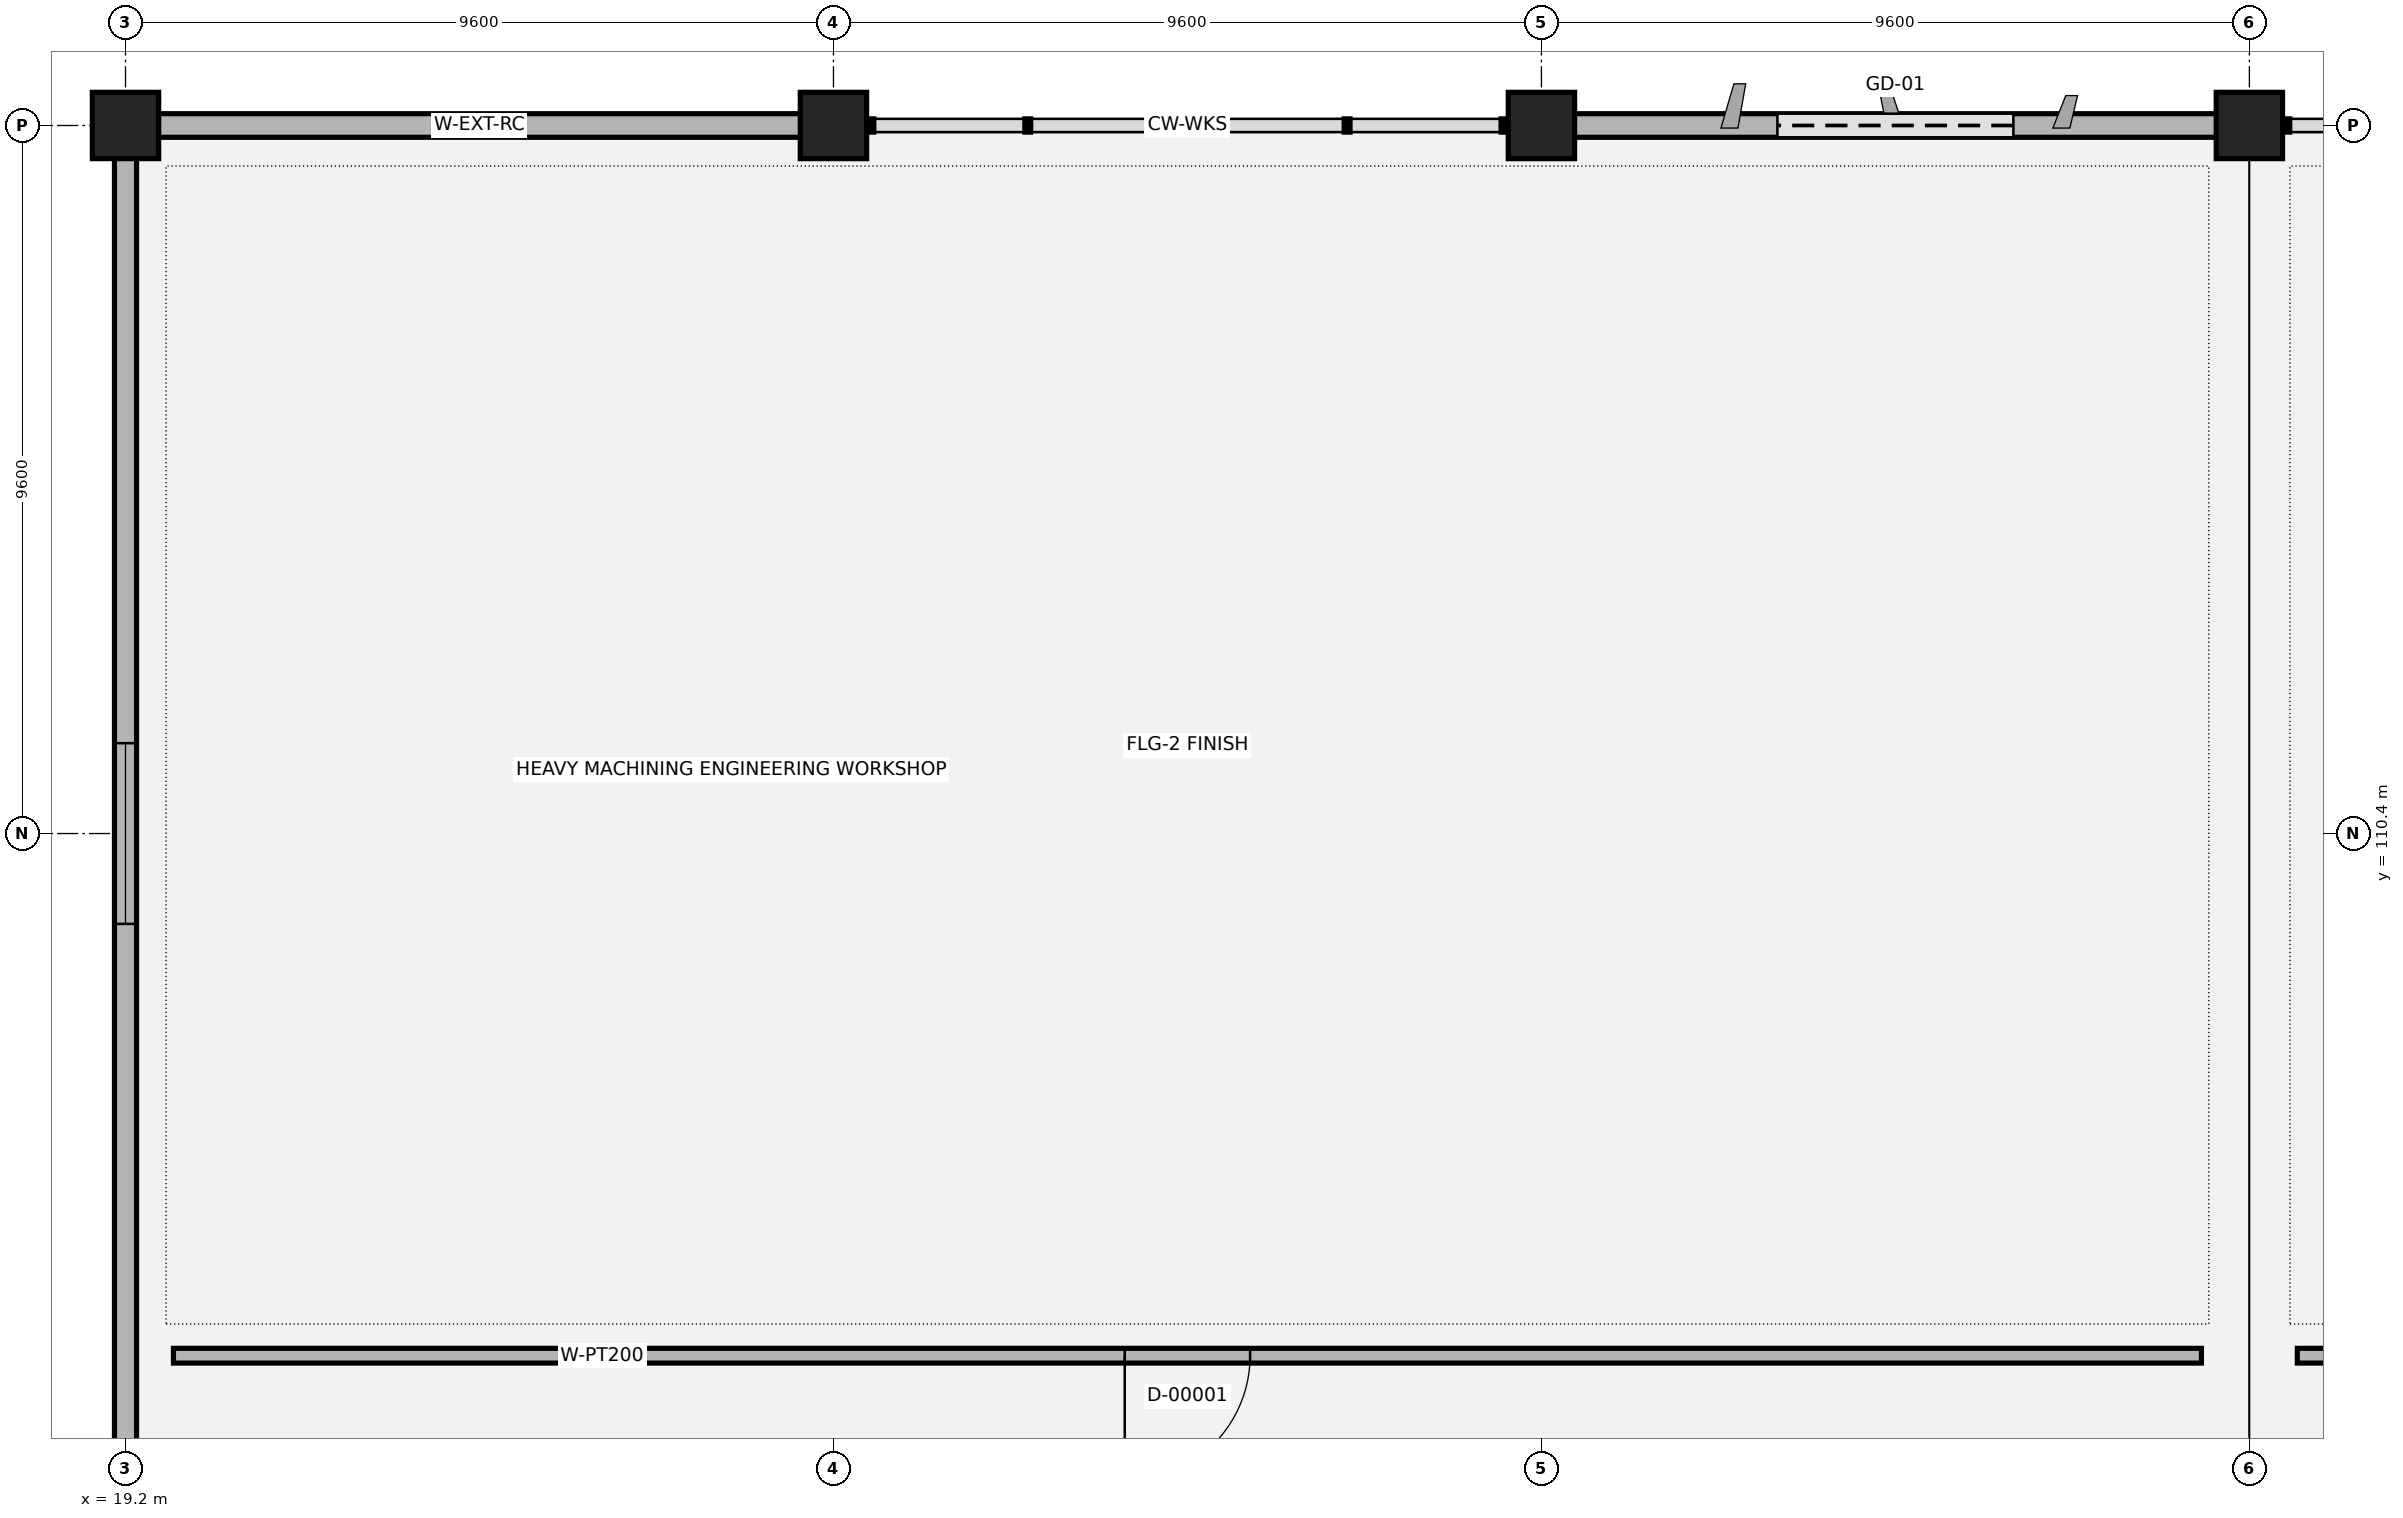
"""IFC4 building model, lengths in metres.
Left out: names, types, materials, properties, quantities, classifications, styles, units other than length and angle.
Written with IfcOpenShell. Run it as: python <this file> out.ifc"""

import sys

from ifc_helpers import new_model, si_unit, direction, frame, frame_2d, origin, origin_2d, place, context, subcontext, project, spatial, rectangle, extrude, element, fill, save


model = new_model("IFC4")
c1 = context("Model", 3, precision=1e-05, world=origin(), true_north=direction((0.0, 1.0)))
c2 = subcontext(c1, "Body", "Model", "MODEL_VIEW")
j1 = project(units=[si_unit("LENGTHUNIT", "METRE"), si_unit("PLANEANGLEUNIT", "RADIAN")], contexts=[c1])
p1 = place(None, origin())
s1 = spatial("IfcSite", under=j1, at=p1, CompositionType="ELEMENT")
p2 = place(p1, origin())
s2 = spatial("IfcBuilding", under=s1, at=p2, CompositionType="ELEMENT")
p3 = place(p2, origin())
s3 = spatial("IfcBuildingStorey", under=s2, at=p3, CompositionType="ELEMENT", Elevation=0.0)
for number, where, z_axis, x_axis in (
    (1, (19.2, 120.0, 0.0), (0.0, 0.0, 1.0), (1.0, 0.0, 0.0)),
    (2, (28.8, 120.0, 0.0), (0.0, 0.0, 1.0), (1.0, 0.0, 0.0)),
    (3, (38.4, 120.0, 0.0), (0.0, 0.0, 1.0), (1.0, 0.0, 0.0)),
    (4, (48.0, 120.0, 0.0), (0.0, 0.0, 1.0), (1.0, 0.0, 0.0)),
):
    element("IfcColumn", number, at=place(p3, frame(where, z_axis=z_axis, x_axis=x_axis)), inside=s3, PredefinedType="COLUMN", context=c2, shape_type="SweptSolid", body=[
        extrude(rectangle(XDim=0.9, YDim=0.9, at=origin_2d()), origin(), (0.0, 0.0, 1.0), 5.4),
    ])
p4 = place(p3, frame((28.42, 120.0, 0.0), z_axis=(0.0, 0.0, 1.0), x_axis=(-1.0, 0.0, 0.0)))
e5 = element("IfcWall", 5, at=p4, inside=s3, PredefinedType="SOLIDWALL", context=c2, shape_type="SweptSolid", body=[
    extrude(rectangle(XDim=8.84, YDim=0.32, at=frame_2d((4.42, 0.0))), origin(), (0.0, 0.0, 1.0), 4.04),
])
p5 = place(p3, frame((47.62, 120.0, 0.0), z_axis=(0.0, 0.0, 1.0), x_axis=(-1.0, 0.0, 0.0)))
e6 = element("IfcWall", 6, at=p5, inside=s3, PredefinedType="SOLIDWALL", context=c2, shape_type="SweptSolid", body=[
    extrude(rectangle(XDim=8.84, YDim=0.32, at=frame_2d((4.42, 0.0))), origin(), (0.0, 0.0, 1.0), 4.04),
])
p6 = place(p5, frame((2.82, 0.0, 0.0)))
e7 = element("IfcOpeningElement", 7, at=p6, cuts=e6, PredefinedType="OPENING", context=c2, shape_type="SweptSolid", body=[
    extrude(rectangle(XDim=3.2, YDim=3.0, at=frame_2d((1.6, 1.5))), frame((0.0, 0.17, 0.0), z_axis=(0.0, -1.0, 0.0), x_axis=(1.0, 0.0, 0.0)), (0.0, 0.0, 1.0), 0.34),
])
p7 = place(p3, frame((19.2, 119.62, 0.0), z_axis=(0.0, 0.0, 1.0), x_axis=(0.0, -1.0, 0.0)))
e8 = element("IfcWall", 8, at=p7, inside=s3, PredefinedType="SOLIDWALL", context=c2, shape_type="SweptSolid", body=[
    extrude(rectangle(XDim=18.44, YDim=0.3, at=frame_2d((9.22, 0.0))), origin(), (0.0, 0.0, 1.0), 4.14),
])
p8 = place(p7, frame((7.995, 0.0, 0.9)))
e9 = element("IfcOpeningElement", 9, at=p8, cuts=e8, PredefinedType="OPENING", context=c2, shape_type="SweptSolid", body=[
    extrude(rectangle(XDim=2.45, YDim=1.7, at=frame_2d((1.225, 0.85))), frame((0.0, 0.16, 0.0), z_axis=(0.0, -1.0, 0.0), x_axis=(1.0, 0.0, 0.0)), (0.0, 0.0, 1.0), 0.32),
])
p9 = place(p3, frame((19.85, 103.32, 0.0), z_axis=(0.0, 0.0, 1.0), x_axis=(1.0, 0.0, 0.0)))
e10 = element("IfcWall", 10, at=p9, inside=s3, PredefinedType="PARTITIONING", context=c2, shape_type="SweptSolid", body=[
    extrude(rectangle(XDim=27.5, YDim=0.2, at=frame_2d((13.75, 0.0))), origin(), (0.0, 0.0, 1.0), 4.04),
])
p10 = place(p9, frame((12.9, 0.0, 0.0)))
e11 = element("IfcOpeningElement", 11, at=p10, cuts=e10, PredefinedType="OPENING", context=c2, shape_type="SweptSolid", body=[
    extrude(rectangle(XDim=1.7, YDim=2.2, at=frame_2d((0.85, 1.1))), frame((0.0, 0.11, 0.0), z_axis=(0.0, -1.0, 0.0), x_axis=(1.0, 0.0, 0.0)), (0.0, 0.0, 1.0), 0.22),
])
p11 = place(p3, frame((48.65, 103.32, 0.0), z_axis=(0.0, 0.0, 1.0), x_axis=(1.0, 0.0, 0.0)))
e12 = element("IfcWall", 12, at=p11, inside=s3, PredefinedType="PARTITIONING", context=c2, shape_type="SweptSolid", body=[
    extrude(rectangle(XDim=27.5, YDim=0.2, at=frame_2d((13.75, 0.0))), origin(), (0.0, 0.0, 1.0), 4.04),
])
p12 = place(p11, frame((4.135, 0.0, 0.0)))
e13 = element("IfcOpeningElement", 13, at=p12, cuts=e12, PredefinedType="OPENING", context=c2, shape_type="SweptSolid", body=[
    extrude(rectangle(XDim=1.8, YDim=2.2, at=frame_2d((0.9, 1.1))), frame((0.0, 0.11, 0.0), z_axis=(0.0, -1.0, 0.0), x_axis=(1.0, 0.0, 0.0)), (0.0, 0.0, 1.0), 0.22),
])
p13 = place(p6, origin())
e14 = element("IfcDoor", 14, at=p13, inside=s3, OperationType="ROLLINGUP", PredefinedType="GATE", context=c2, shape_type="SweptSolid", body=[
    extrude(rectangle(XDim=3.2, YDim=3.0, at=frame_2d((1.6, 1.5))), frame((0.0, 0.025, 0.0), z_axis=(0.0, -1.0, 0.0), x_axis=(1.0, 0.0, 0.0)), (0.0, 0.0, 1.0), 0.05),
])
fill(e7, e14)
p14 = place(p8, origin())
e15 = element("IfcWindow", 15, at=p14, inside=s3, PartitioningType="SINGLE_PANEL", PredefinedType="WINDOW", context=c2, shape_type="SweptSolid", body=[
    extrude(rectangle(XDim=2.45, YDim=1.7, at=frame_2d((1.225, 0.85))), frame((0.0, 0.03, 0.0), z_axis=(0.0, -1.0, 0.0), x_axis=(1.0, 0.0, 0.0)), (0.0, 0.0, 1.0), 0.06),
])
fill(e9, e15)
p15 = place(p10, origin())
e16 = element("IfcDoor", 16, at=p15, inside=s3, OperationType="SINGLE_SWING_RIGHT", PredefinedType="DOOR", context=c2, shape_type="SweptSolid", body=[
    extrude(rectangle(XDim=1.7, YDim=2.2, at=frame_2d((0.85, 1.1))), frame((0.0, 0.025, 0.0), z_axis=(0.0, -1.0, 0.0), x_axis=(1.0, 0.0, 0.0)), (0.0, 0.0, 1.0), 0.05),
])
fill(e11, e16)
save(model, sys.argv[1])
